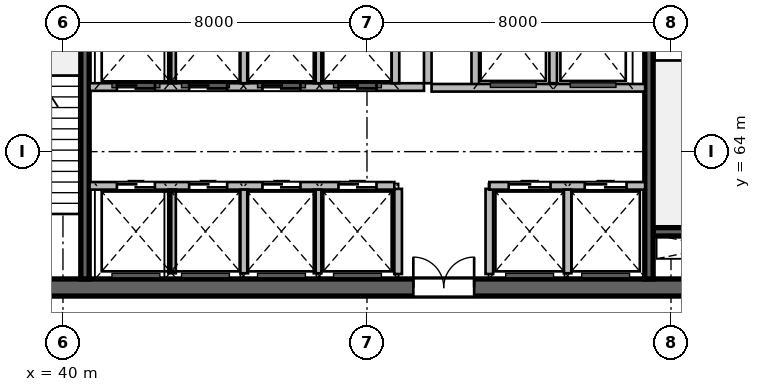
"""IFC4 building model, lengths in metres.
Left out: names, types, materials, properties, quantities, classifications, styles, units other than length and angle.
Written with IfcOpenShell. Run it as: python <this file> out.ifc"""

import sys

from ifc_helpers import new_model, si_unit, direction, frame, frame_2d, origin, place, context, subcontext, project, spatial, rectangle, extrude, source, transform, mapped, element, fill, save


model = new_model("IFC4")
c1 = context("Model", 3, precision=1e-05, world=origin(), true_north=direction((0.0, 1.0)))
c2 = subcontext(c1, "Body", "Model", "MODEL_VIEW")
j1 = project(units=[si_unit("LENGTHUNIT", "METRE"), si_unit("PLANEANGLEUNIT", "RADIAN")], contexts=[c1])
p1 = place(None, origin())
s1 = spatial("IfcSite", under=j1, at=p1, CompositionType="ELEMENT")
p2 = place(p1, origin())
s2 = spatial("IfcBuilding", under=s1, at=p2, CompositionType="ELEMENT")
p3 = place(p2, frame((0.0, 0.0, 199.2)))
s3 = spatial("IfcBuildingStorey", under=s2, at=p3, CompositionType="ELEMENT", Elevation=199.2)
m1 = source(origin(), c2, "Body", "SweptSolid", [
    extrude(rectangle(XDim=21.6, YDim=0.45, at=frame_2d((10.8, 0.0))), origin(), (0.0, 0.0, 1.0), 4.8),
])
p4 = place(p3, frame((37.2, 60.425, 0.0), z_axis=(0.0, 0.0, 1.0), x_axis=(1.0, 0.0, 0.0)))
e1 = element("IfcWall", 1, at=p4, inside=s3, PredefinedType="SHEAR", context=c2, shape_type="MappedRepresentation", body=[
    mapped(m1, transform((0.0, 0.0, 0.0), scale=1.0)),
])
p5 = place(p4, frame((1.1, 0.0, 0.0)))
e2 = element("IfcOpeningElement", 2, at=p5, cuts=e1, PredefinedType="OPENING", context=c2, shape_type="SweptSolid", body=[
    extrude(rectangle(XDim=1.15, YDim=2.15, at=frame_2d((0.575, 1.075))), frame((0.0, 0.235, 0.0), z_axis=(0.0, -1.0, 0.0), x_axis=(1.0, 0.0, 0.0)), (0.0, 0.0, 1.0), 0.47),
])
p6 = place(p4, frame((19.5, 0.0, 0.0)))
e3 = element("IfcOpeningElement", 3, at=p6, cuts=e1, PredefinedType="OPENING", context=c2, shape_type="SweptSolid", body=[
    extrude(rectangle(XDim=0.9, YDim=2.1, at=frame_2d((0.45, 1.05))), frame((0.0, 0.235, 0.0), z_axis=(0.0, -1.0, 0.0), x_axis=(1.0, 0.0, 0.0)), (0.0, 0.0, 1.0), 0.47),
])
p7 = place(p4, frame((12.02, 0.0, 0.0)))
e4 = element("IfcOpeningElement", 4, at=p7, cuts=e1, PredefinedType="OPENING", context=c2, shape_type="SweptSolid", body=[
    extrude(rectangle(XDim=1.6, YDim=2.15, at=frame_2d((0.8, 1.075))), frame((0.0, 0.235, 0.0), z_axis=(0.0, -1.0, 0.0), x_axis=(1.0, 0.0, 0.0)), (0.0, 0.0, 1.0), 0.47),
])
m2 = source(origin(), c2, "Body", "SweptSolid", [
    extrude(rectangle(XDim=3.27, YDim=0.22, at=frame_2d((1.635, 0.0))), origin(), (0.0, 0.0, 1.0), 4.8),
])
p8 = place(p3, frame((55.53, 61.89, 0.0), z_axis=(0.0, 0.0, 1.0), x_axis=(1.0, 0.0, 0.0)))
e5 = element("IfcWall", 5, at=p8, inside=s3, PredefinedType="SHEAR", context=c2, shape_type="MappedRepresentation", body=[
    mapped(m2, transform((0.0, 0.0, 0.0), scale=1.0)),
])
m3 = source(origin(), c2, "Body", "SweptSolid", [
    extrude(rectangle(XDim=11.1, YDim=0.22, at=frame_2d((5.55, 0.0))), origin(), (0.0, 0.0, 1.0), 4.8),
])
p9 = place(p3, frame((40.58, 60.65, 0.0), z_axis=(0.0, 0.0, 1.0), x_axis=(0.0, 1.0, 0.0)))
e6 = element("IfcWall", 6, at=p9, inside=s3, PredefinedType="SHEAR", context=c2, shape_type="MappedRepresentation", body=[
    mapped(m3, transform((0.0, 0.0, 0.0), scale=1.0)),
])
p10 = place(p3, frame((55.42, 60.65, 0.0), z_axis=(0.0, 0.0, 1.0), x_axis=(0.0, 1.0, 0.0)))
e7 = element("IfcWall", 7, at=p10, inside=s3, PredefinedType="SHEAR", context=c2, shape_type="MappedRepresentation", body=[
    mapped(m3, transform((0.0, 0.0, 0.0), scale=1.0)),
])
p11 = place(p10, frame((9.595, 0.0, 0.0)))
e8 = element("IfcOpeningElement", 8, at=p11, cuts=e7, PredefinedType="OPENING", context=c2, shape_type="SweptSolid", body=[
    extrude(rectangle(XDim=1.15, YDim=2.15, at=frame_2d((0.575, 1.075))), frame((0.0, 0.12, 0.0), z_axis=(0.0, -1.0, 0.0), x_axis=(1.0, 0.0, 0.0)), (0.0, 0.0, 1.0), 0.24),
])
m4 = source(origin(), c2, "Body", "SweptSolid", [
    extrude(rectangle(XDim=2.24, YDim=0.2, at=frame_2d((1.12, 0.0))), origin(), (0.0, 0.0, 1.0), 4.54),
])
for number, where, z_axis, x_axis in (
    (9, (48.82, 60.78, 0.0), (0.0, 0.0, 1.0), (0.0, 1.0, 0.0)),
    (10, (51.22, 60.78, 0.0), (0.0, 0.0, 1.0), (0.0, 1.0, 0.0)),
):
    element("IfcWall", number, at=place(p3, frame(where, z_axis=z_axis, x_axis=x_axis)), inside=s3, PredefinedType="SOLIDWALL", context=c2, shape_type="MappedRepresentation", body=[
        mapped(m4, transform((0.0, 0.0, 0.0), scale=1.0)),
    ])
m5 = source(origin(), c2, "Body", "SweptSolid", [
    extrude(rectangle(XDim=5.8, YDim=0.2, at=frame_2d((2.9, 0.0))), origin(), (0.0, 0.0, 1.0), 4.54),
])
p12 = place(p3, frame((49.6, 65.8, 0.0), z_axis=(0.0, 0.0, 1.0), x_axis=(0.0, 1.0, 0.0)))
e11 = element("IfcWall", 11, at=p12, inside=s3, PredefinedType="SOLIDWALL", context=c2, shape_type="MappedRepresentation", body=[
    mapped(m5, transform((0.0, 0.0, 0.0), scale=1.0)),
])
m6 = source(origin(), c2, "Body", "SweptSolid", [
    extrude(rectangle(XDim=2.58, YDim=0.2, at=frame_2d((1.29, 0.0))), origin(), (0.0, 0.0, 1.0), 4.54),
])
p13 = place(p3, frame((50.85, 65.68, 0.0), z_axis=(0.0, 0.0, 1.0), x_axis=(0.0, 1.0, 0.0)))
e12 = element("IfcWall", 12, at=p13, inside=s3, PredefinedType="SOLIDWALL", context=c2, shape_type="MappedRepresentation", body=[
    mapped(m6, transform((0.0, 0.0, 0.0), scale=1.0)),
])
m7 = source(origin(), c2, "Body", "SweptSolid", [
    extrude(rectangle(XDim=2.4, YDim=0.2, at=frame_2d((1.2, 0.0))), origin(), (0.0, 0.0, 1.0), 4.54),
])
p14 = place(p3, frame((52.9, 65.8, 0.0), z_axis=(0.0, 0.0, 1.0), x_axis=(0.0, 1.0, 0.0)))
e13 = element("IfcWall", 13, at=p14, inside=s3, PredefinedType="SOLIDWALL", context=c2, shape_type="MappedRepresentation", body=[
    mapped(m7, transform((0.0, 0.0, 0.0), scale=1.0)),
])
m8 = source(origin(), c2, "Body", "SweptSolid", [
    extrude(rectangle(XDim=5.62, YDim=0.2, at=frame_2d((2.81, 0.0))), origin(), (0.0, 0.0, 1.0), 4.54),
])
p15 = place(p3, frame((49.7, 65.68, 0.0), z_axis=(0.0, 0.0, 1.0), x_axis=(1.0, 0.0, 0.0)))
e14 = element("IfcWall", 14, at=p15, inside=s3, PredefinedType="SOLIDWALL", context=c2, shape_type="MappedRepresentation", body=[
    mapped(m8, transform((0.0, 0.0, 0.0), scale=1.0)),
])
m9 = source(origin(), c2, "Body", "SweptSolid", [
    extrude(rectangle(XDim=8.02, YDim=0.2, at=frame_2d((4.01, 0.0))), origin(), (0.0, 0.0, 1.0), 4.54),
])
p16 = place(p3, frame((40.7, 63.1, 0.0), z_axis=(0.0, 0.0, 1.0), x_axis=(1.0, 0.0, 0.0)))
e15 = element("IfcWall", 15, at=p16, inside=s3, PredefinedType="SOLIDWALL", context=c2, shape_type="MappedRepresentation", body=[
    mapped(m9, transform((0.0, 0.0, 0.0), scale=1.0)),
])
p17 = place(p16, frame((0.72, 0.0, 0.0)))
e16 = element("IfcOpeningElement", 16, at=p17, cuts=e15, PredefinedType="OPENING", context=c2, shape_type="SweptSolid", body=[
    extrude(rectangle(XDim=1.0, YDim=2.15, at=frame_2d((0.5, 1.075))), frame((0.0, 0.11, 0.0), z_axis=(0.0, -1.0, 0.0), x_axis=(1.0, 0.0, 0.0)), (0.0, 0.0, 1.0), 0.22),
])
p18 = place(p16, frame((2.62, 0.0, 0.0)))
e17 = element("IfcOpeningElement", 17, at=p18, cuts=e15, PredefinedType="OPENING", context=c2, shape_type="SweptSolid", body=[
    extrude(rectangle(XDim=1.0, YDim=2.15, at=frame_2d((0.5, 1.075))), frame((0.0, 0.11, 0.0), z_axis=(0.0, -1.0, 0.0), x_axis=(1.0, 0.0, 0.0)), (0.0, 0.0, 1.0), 0.22),
])
p19 = place(p16, frame((4.55, 0.0, 0.0)))
e18 = element("IfcOpeningElement", 18, at=p19, cuts=e15, PredefinedType="OPENING", context=c2, shape_type="SweptSolid", body=[
    extrude(rectangle(XDim=1.0, YDim=2.15, at=frame_2d((0.5, 1.075))), frame((0.0, 0.11, 0.0), z_axis=(0.0, -1.0, 0.0), x_axis=(1.0, 0.0, 0.0)), (0.0, 0.0, 1.0), 0.22),
])
p20 = place(p16, frame((6.55, 0.0, 0.0)))
e19 = element("IfcOpeningElement", 19, at=p20, cuts=e15, PredefinedType="OPENING", context=c2, shape_type="SweptSolid", body=[
    extrude(rectangle(XDim=1.0, YDim=2.15, at=frame_2d((0.5, 1.075))), frame((0.0, 0.11, 0.0), z_axis=(0.0, -1.0, 0.0), x_axis=(1.0, 0.0, 0.0)), (0.0, 0.0, 1.0), 0.22),
])
m10 = source(origin(), c2, "Body", "SweptSolid", [
    extrude(rectangle(XDim=4.1, YDim=0.2, at=frame_2d((2.05, 0.0))), origin(), (0.0, 0.0, 1.0), 4.54),
])
p21 = place(p3, frame((51.22, 63.1, 0.0), z_axis=(0.0, 0.0, 1.0), x_axis=(1.0, 0.0, 0.0)))
e20 = element("IfcWall", 20, at=p21, inside=s3, PredefinedType="SOLIDWALL", context=c2, shape_type="MappedRepresentation", body=[
    mapped(m10, transform((0.0, 0.0, 0.0), scale=1.0)),
])
p22 = place(p21, frame((0.51, 0.0, 0.0)))
e21 = element("IfcOpeningElement", 21, at=p22, cuts=e20, PredefinedType="OPENING", context=c2, shape_type="SweptSolid", body=[
    extrude(rectangle(XDim=1.1, YDim=2.15, at=frame_2d((0.55, 1.075))), frame((0.0, 0.11, 0.0), z_axis=(0.0, -1.0, 0.0), x_axis=(1.0, 0.0, 0.0)), (0.0, 0.0, 1.0), 0.22),
])
p23 = place(p21, frame((2.51, 0.0, 0.0)))
e22 = element("IfcOpeningElement", 22, at=p23, cuts=e20, PredefinedType="OPENING", context=c2, shape_type="SweptSolid", body=[
    extrude(rectangle(XDim=1.1, YDim=2.15, at=frame_2d((0.55, 1.075))), frame((0.0, 0.11, 0.0), z_axis=(0.0, -1.0, 0.0), x_axis=(1.0, 0.0, 0.0)), (0.0, 0.0, 1.0), 0.22),
])
m11 = source(origin(), c2, "Body", "SweptSolid", [
    extrude(rectangle(XDim=2.2, YDim=0.2, at=frame_2d((1.1, 0.0))), origin(), (0.0, 0.0, 1.0), 4.54),
])
for number, where, z_axis, x_axis in (
    (23, (42.87, 60.8, 0.0), (0.0, 0.0, 1.0), (0.0, 1.0, 0.0)),
    (24, (44.77, 60.8, 0.0), (0.0, 0.0, 1.0), (0.0, 1.0, 0.0)),
    (25, (46.7, 60.8, 0.0), (0.0, 0.0, 1.0), (0.0, 1.0, 0.0)),
    (26, (53.28, 60.8, 0.0), (0.0, 0.0, 1.0), (0.0, 1.0, 0.0)),
):
    element("IfcWall", number, at=place(p3, frame(where, z_axis=z_axis, x_axis=x_axis)), inside=s3, PredefinedType="SOLIDWALL", context=c2, shape_type="MappedRepresentation", body=[
        mapped(m11, transform((0.0, 0.0, 0.0), scale=1.0)),
    ])
m12 = source(origin(), c2, "Body", "SweptSolid", [
    extrude(rectangle(XDim=8.8, YDim=0.2, at=frame_2d((4.4, 0.0))), origin(), (0.0, 0.0, 1.0), 4.54),
])
p24 = place(p3, frame((40.7, 65.7, 0.0), z_axis=(0.0, 0.0, 1.0), x_axis=(1.0, 0.0, 0.0)))
e27 = element("IfcWall", 27, at=p24, inside=s3, PredefinedType="SOLIDWALL", context=c2, shape_type="MappedRepresentation", body=[
    mapped(m12, transform((0.0, 0.0, 0.0), scale=1.0)),
])
p25 = place(p24, frame((0.72, 0.0, 0.0)))
e28 = element("IfcOpeningElement", 28, at=p25, cuts=e27, PredefinedType="OPENING", context=c2, shape_type="SweptSolid", body=[
    extrude(rectangle(XDim=1.0, YDim=2.15, at=frame_2d((0.5, 1.075))), frame((0.0, 0.11, 0.0), z_axis=(0.0, -1.0, 0.0), x_axis=(1.0, 0.0, 0.0)), (0.0, 0.0, 1.0), 0.22),
])
p26 = place(p24, frame((2.62, 0.0, 0.0)))
e29 = element("IfcOpeningElement", 29, at=p26, cuts=e27, PredefinedType="OPENING", context=c2, shape_type="SweptSolid", body=[
    extrude(rectangle(XDim=1.0, YDim=2.15, at=frame_2d((0.5, 1.075))), frame((0.0, 0.11, 0.0), z_axis=(0.0, -1.0, 0.0), x_axis=(1.0, 0.0, 0.0)), (0.0, 0.0, 1.0), 0.22),
])
p27 = place(p24, frame((4.55, 0.0, 0.0)))
e30 = element("IfcOpeningElement", 30, at=p27, cuts=e27, PredefinedType="OPENING", context=c2, shape_type="SweptSolid", body=[
    extrude(rectangle(XDim=1.0, YDim=2.15, at=frame_2d((0.5, 1.075))), frame((0.0, 0.11, 0.0), z_axis=(0.0, -1.0, 0.0), x_axis=(1.0, 0.0, 0.0)), (0.0, 0.0, 1.0), 0.22),
])
p28 = place(p24, frame((6.55, 0.0, 0.0)))
e31 = element("IfcOpeningElement", 31, at=p28, cuts=e27, PredefinedType="OPENING", context=c2, shape_type="SweptSolid", body=[
    extrude(rectangle(XDim=1.0, YDim=2.15, at=frame_2d((0.5, 1.075))), frame((0.0, 0.11, 0.0), z_axis=(0.0, -1.0, 0.0), x_axis=(1.0, 0.0, 0.0)), (0.0, 0.0, 1.0), 0.22),
])
for number, where, z_axis, x_axis in (
    (32, (48.75, 65.8, 0.0), (0.0, 0.0, 1.0), (0.0, 1.0, 0.0)),
    (33, (42.87, 65.8, 0.0), (0.0, 0.0, 1.0), (0.0, 1.0, 0.0)),
    (34, (44.77, 65.8, 0.0), (0.0, 0.0, 1.0), (0.0, 1.0, 0.0)),
    (35, (46.7, 65.8, 0.0), (0.0, 0.0, 1.0), (0.0, 1.0, 0.0)),
):
    element("IfcWall", number, at=place(p3, frame(where, z_axis=z_axis, x_axis=x_axis)), inside=s3, PredefinedType="SOLIDWALL", context=c2, shape_type="MappedRepresentation", body=[
        mapped(m7, transform((0.0, 0.0, 0.0), scale=1.0)),
    ])
m13 = source(origin(), c2, "Body", "SweptSolid", [
    extrude(rectangle(XDim=1.6, YDim=2.15, at=frame_2d((0.8, 1.075))), frame((0.0, 0.025, 0.0), z_axis=(0.0, -1.0, 0.0), x_axis=(1.0, 0.0, 0.0)), (0.0, 0.0, 1.0), 0.05),
])
p29 = place(p7, origin())
e36 = element("IfcDoor", 36, at=p29, inside=s3, OperationType="DOUBLE_DOOR_SINGLE_SWING", PredefinedType="DOOR", context=c2, shape_type="MappedRepresentation", body=[
    mapped(m13, transform((0.0, 0.0, 0.0), scale=1.0)),
])
fill(e4, e36)
m14 = source(origin(), c2, "Body", "SweptSolid", [
    extrude(rectangle(XDim=1.0, YDim=2.15, at=frame_2d((0.5, 1.075))), frame((0.0, 0.025, 0.0), z_axis=(0.0, -1.0, 0.0), x_axis=(1.0, 0.0, 0.0)), (0.0, 0.0, 1.0), 0.05),
])
p30 = place(p17, origin())
e37 = element("IfcDoor", 37, at=p30, inside=s3, OperationType="DOUBLE_DOOR_SLIDING", PredefinedType="DOOR", context=c2, shape_type="MappedRepresentation", body=[
    mapped(m14, transform((0.0, 0.0, 0.0), scale=1.0)),
])
fill(e16, e37)
p31 = place(p18, origin())
e38 = element("IfcDoor", 38, at=p31, inside=s3, OperationType="DOUBLE_DOOR_SLIDING", PredefinedType="DOOR", context=c2, shape_type="MappedRepresentation", body=[
    mapped(m14, transform((0.0, 0.0, 0.0), scale=1.0)),
])
fill(e17, e38)
p32 = place(p19, origin())
e39 = element("IfcDoor", 39, at=p32, inside=s3, OperationType="DOUBLE_DOOR_SLIDING", PredefinedType="DOOR", context=c2, shape_type="MappedRepresentation", body=[
    mapped(m14, transform((0.0, 0.0, 0.0), scale=1.0)),
])
fill(e18, e39)
p33 = place(p20, origin())
e40 = element("IfcDoor", 40, at=p33, inside=s3, OperationType="DOUBLE_DOOR_SLIDING", PredefinedType="DOOR", context=c2, shape_type="MappedRepresentation", body=[
    mapped(m14, transform((0.0, 0.0, 0.0), scale=1.0)),
])
fill(e19, e40)
m15 = source(origin(), c2, "Body", "SweptSolid", [
    extrude(rectangle(XDim=1.1, YDim=2.15, at=frame_2d((0.55, 1.075))), frame((0.0, 0.025, 0.0), z_axis=(0.0, -1.0, 0.0), x_axis=(1.0, 0.0, 0.0)), (0.0, 0.0, 1.0), 0.05),
])
p34 = place(p22, origin())
e41 = element("IfcDoor", 41, at=p34, inside=s3, OperationType="DOUBLE_DOOR_SLIDING", PredefinedType="DOOR", context=c2, shape_type="MappedRepresentation", body=[
    mapped(m15, transform((0.0, 0.0, 0.0), scale=1.0)),
])
fill(e21, e41)
p35 = place(p23, origin())
e42 = element("IfcDoor", 42, at=p35, inside=s3, OperationType="DOUBLE_DOOR_SLIDING", PredefinedType="DOOR", context=c2, shape_type="MappedRepresentation", body=[
    mapped(m15, transform((0.0, 0.0, 0.0), scale=1.0)),
])
fill(e22, e42)
p36 = place(p25, origin())
e43 = element("IfcDoor", 43, at=p36, inside=s3, OperationType="DOUBLE_DOOR_SLIDING", PredefinedType="DOOR", context=c2, shape_type="MappedRepresentation", body=[
    mapped(m14, transform((0.0, 0.0, 0.0), scale=1.0)),
])
fill(e28, e43)
p37 = place(p26, origin())
e44 = element("IfcDoor", 44, at=p37, inside=s3, OperationType="DOUBLE_DOOR_SLIDING", PredefinedType="DOOR", context=c2, shape_type="MappedRepresentation", body=[
    mapped(m14, transform((0.0, 0.0, 0.0), scale=1.0)),
])
fill(e29, e44)
p38 = place(p27, origin())
e45 = element("IfcDoor", 45, at=p38, inside=s3, OperationType="DOUBLE_DOOR_SLIDING", PredefinedType="DOOR", context=c2, shape_type="MappedRepresentation", body=[
    mapped(m14, transform((0.0, 0.0, 0.0), scale=1.0)),
])
fill(e30, e45)
p39 = place(p28, origin())
e46 = element("IfcDoor", 46, at=p39, inside=s3, OperationType="DOUBLE_DOOR_SLIDING", PredefinedType="DOOR", context=c2, shape_type="MappedRepresentation", body=[
    mapped(m14, transform((0.0, 0.0, 0.0), scale=1.0)),
])
fill(e31, e46)
save(model, sys.argv[1])
